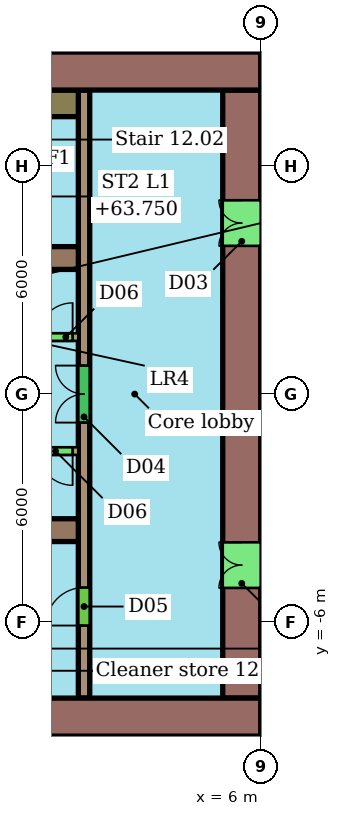
"""IFC4 building model, lengths in metres.
Left out: names, types, materials, properties, quantities, classifications, styles, units other than length and angle.
Written with IfcOpenShell. Run it as: python <this file> out.ifc"""

import sys

from ifc_helpers import new_model, si_unit, direction, frame, frame_2d, origin, place, context, subcontext, project, spatial, rectangle, extrude, element, fill, save


model = new_model("IFC4")
c1 = context("Model", 3, precision=1e-05, world=origin(), true_north=direction((0.0, 1.0)))
c2 = subcontext(c1, "Body", "Model", "MODEL_VIEW")
j1 = project(units=[si_unit("LENGTHUNIT", "METRE"), si_unit("PLANEANGLEUNIT", "RADIAN")], contexts=[c1])
p1 = place(None, origin())
s1 = spatial("IfcSite", under=j1, at=p1, CompositionType="ELEMENT")
p2 = place(p1, origin())
s2 = spatial("IfcBuilding", under=s1, at=p2, CompositionType="ELEMENT")
p3 = place(p2, frame((0.0, 0.0, 61.9)))
s3 = spatial("IfcBuildingStorey", under=s2, at=p3, CompositionType="ELEMENT", Elevation=61.9)
p4 = place(p3, frame((6.0, 8.5, 0.0), z_axis=(0.0, 0.0, 1.0), x_axis=(-1.0, 0.0, 0.0)))
e1 = element("IfcWall", 1, at=p4, inside=s3, PredefinedType="SHEAR", context=c2, shape_type="SweptSolid", body=[
    extrude(rectangle(XDim=12.0, YDim=1.0, at=frame_2d((6.0, 0.0))), origin(), (0.0, 0.0, 1.0), 3.4),
])
p5 = place(p4, frame((5.6, 0.0, 0.0)))
e2 = element("IfcOpeningElement", 2, at=p5, cuts=e1, PredefinedType="OPENING", context=c2, shape_type="SweptSolid", body=[
    extrude(rectangle(XDim=1.2, YDim=2.1, at=frame_2d((0.6, 1.05))), frame((0.0, 0.51, 0.0), z_axis=(0.0, -1.0, 0.0), x_axis=(1.0, 0.0, 0.0)), (0.0, 0.0, 1.0), 1.02),
])
p6 = place(p3, frame((-18.0, -8.5, 0.0), z_axis=(0.0, 0.0, 1.0), x_axis=(1.0, 0.0, 0.0)))
e3 = element("IfcWall", 3, at=p6, inside=s3, PredefinedType="SHEAR", context=c2, shape_type="SweptSolid", body=[
    extrude(rectangle(XDim=24.0, YDim=1.0, at=frame_2d((12.0, 0.0))), origin(), (0.0, 0.0, 1.0), 3.4),
])
p7 = place(p6, frame((6.0, 0.0, 0.0)))
e4 = element("IfcOpeningElement", 4, at=p7, cuts=e3, PredefinedType="OPENING", context=c2, shape_type="SweptSolid", body=[
    extrude(rectangle(XDim=1.2, YDim=2.1, at=frame_2d((0.6, 1.05))), frame((0.0, 0.51, 0.0), z_axis=(0.0, -1.0, 0.0), x_axis=(1.0, 0.0, 0.0)), (0.0, 0.0, 1.0), 1.02),
])
p8 = place(p3, frame((5.5, -8.0, 0.0), z_axis=(0.0, 0.0, 1.0), x_axis=(0.0, 1.0, 0.0)))
e5 = element("IfcWall", 5, at=p8, inside=s3, PredefinedType="SHEAR", context=c2, shape_type="SweptSolid", body=[
    extrude(rectangle(XDim=16.0, YDim=1.0, at=frame_2d((8.0, 0.0))), origin(), (0.0, 0.0, 1.0), 3.4),
])
p9 = place(p8, frame((2.9, 0.0, 0.0)))
e6 = element("IfcOpeningElement", 6, at=p9, cuts=e5, PredefinedType="OPENING", context=c2, shape_type="SweptSolid", body=[
    extrude(rectangle(XDim=1.2, YDim=2.1, at=frame_2d((0.6, 1.05))), frame((0.0, 0.51, 0.0), z_axis=(0.0, -1.0, 0.0), x_axis=(1.0, 0.0, 0.0)), (0.0, 0.0, 1.0), 1.02),
])
p10 = place(p8, frame((11.9, 0.0, 0.0)))
e7 = element("IfcOpeningElement", 7, at=p10, cuts=e5, PredefinedType="OPENING", context=c2, shape_type="SweptSolid", body=[
    extrude(rectangle(XDim=1.2, YDim=2.1, at=frame_2d((0.6, 1.05))), frame((0.0, 0.51, 0.0), z_axis=(0.0, -1.0, 0.0), x_axis=(1.0, 0.0, 0.0)), (0.0, 0.0, 1.0), 1.02),
])
for number, where, z_axis, x_axis in (
    (8, (-6.0, 3.58, 0.0), (0.0, 0.0, 1.0), (1.0, 0.0, 0.0)),
    (9, (-6.0, -3.58, 0.0), (0.0, 0.0, 1.0), (1.0, 0.0, 0.0)),
):
    element("IfcWall", number, at=place(p3, frame(where, z_axis=z_axis, x_axis=x_axis)), inside=s3, PredefinedType="SHEAR", context=c2, shape_type="SweptSolid", body=[
        extrude(rectangle(XDim=7.2, YDim=0.6, at=frame_2d((3.6, 0.0))), origin(), (0.0, 0.0, 1.0), 3.4),
    ])
p11 = place(p3, frame((1.35, -8.0, 0.0), z_axis=(0.0, 0.0, 1.0), x_axis=(0.0, 1.0, 0.0)))
e10 = element("IfcWall", 10, at=p11, inside=s3, PredefinedType="SHEAR", context=c2, shape_type="SweptSolid", body=[
    extrude(rectangle(XDim=16.0, YDim=0.3, at=frame_2d((8.0, 0.0))), origin(), (0.0, 0.0, 1.0), 3.4),
])
p12 = place(p11, frame((1.91, 0.0, 0.0)))
e11 = element("IfcOpeningElement", 11, at=p12, cuts=e10, PredefinedType="OPENING", context=c2, shape_type="SweptSolid", body=[
    extrude(rectangle(XDim=1.0, YDim=2.1, at=frame_2d((0.5, 1.05))), frame((0.0, 0.16, 0.0), z_axis=(0.0, -1.0, 0.0), x_axis=(1.0, 0.0, 0.0)), (0.0, 0.0, 1.0), 0.32),
])
p13 = place(p11, frame((7.25, 0.0, 0.0)))
e12 = element("IfcOpeningElement", 12, at=p13, cuts=e10, PredefinedType="OPENING", context=c2, shape_type="SweptSolid", body=[
    extrude(rectangle(XDim=1.5, YDim=2.1, at=frame_2d((0.75, 1.05))), frame((0.0, 0.16, 0.0), z_axis=(0.0, -1.0, 0.0), x_axis=(1.0, 0.0, 0.0)), (0.0, 0.0, 1.0), 0.32),
])
p14 = place(p3, frame((-13.2, 1.5, 0.0), z_axis=(0.0, 0.0, 1.0), x_axis=(1.0, 0.0, 0.0)))
e13 = element("IfcWall", 13, at=p14, inside=s3, PredefinedType="SHEAR", context=c2, shape_type="SweptSolid", body=[
    extrude(rectangle(XDim=14.4, YDim=0.2, at=frame_2d((7.2, 0.0))), origin(), (0.0, 0.0, 1.0), 3.4),
])
p15 = place(p14, frame((0.546, 0.0, 0.0)))
e14 = element("IfcOpeningElement", 14, at=p15, cuts=e13, PredefinedType="OPENING", context=c2, shape_type="SweptSolid", body=[
    extrude(rectangle(XDim=1.1, YDim=2.1, at=frame_2d((0.55, 1.05))), frame((0.0, 0.11, 0.0), z_axis=(0.0, -1.0, 0.0), x_axis=(1.0, 0.0, 0.0)), (0.0, 0.0, 1.0), 0.22),
])
p16 = place(p14, frame((2.988, 0.0, 0.0)))
e15 = element("IfcOpeningElement", 15, at=p16, cuts=e13, PredefinedType="OPENING", context=c2, shape_type="SweptSolid", body=[
    extrude(rectangle(XDim=1.1, YDim=2.1, at=frame_2d((0.55, 1.05))), frame((0.0, 0.11, 0.0), z_axis=(0.0, -1.0, 0.0), x_axis=(1.0, 0.0, 0.0)), (0.0, 0.0, 1.0), 0.22),
])
p17 = place(p14, frame((5.429, 0.0, 0.0)))
e16 = element("IfcOpeningElement", 16, at=p17, cuts=e13, PredefinedType="OPENING", context=c2, shape_type="SweptSolid", body=[
    extrude(rectangle(XDim=1.1, YDim=2.1, at=frame_2d((0.55, 1.05))), frame((0.0, 0.11, 0.0), z_axis=(0.0, -1.0, 0.0), x_axis=(1.0, 0.0, 0.0)), (0.0, 0.0, 1.0), 0.22),
])
p18 = place(p14, frame((7.871, 0.0, 0.0)))
e17 = element("IfcOpeningElement", 17, at=p18, cuts=e13, PredefinedType="OPENING", context=c2, shape_type="SweptSolid", body=[
    extrude(rectangle(XDim=1.1, YDim=2.1, at=frame_2d((0.55, 1.05))), frame((0.0, 0.11, 0.0), z_axis=(0.0, -1.0, 0.0), x_axis=(1.0, 0.0, 0.0)), (0.0, 0.0, 1.0), 0.22),
])
p19 = place(p14, frame((10.21, 0.0, 0.0)))
e18 = element("IfcOpeningElement", 18, at=p19, cuts=e13, PredefinedType="OPENING", context=c2, shape_type="SweptSolid", body=[
    extrude(rectangle(XDim=1.0, YDim=2.1, at=frame_2d((0.5, 1.05))), frame((0.0, 0.11, 0.0), z_axis=(0.0, -1.0, 0.0), x_axis=(1.0, 0.0, 0.0)), (0.0, 0.0, 1.0), 0.22),
])
p20 = place(p14, frame((13.35, 0.0, 0.0)))
e19 = element("IfcOpeningElement", 19, at=p20, cuts=e13, PredefinedType="OPENING", context=c2, shape_type="SweptSolid", body=[
    extrude(rectangle(XDim=0.9, YDim=2.1, at=frame_2d((0.45, 1.05))), frame((0.0, 0.11, 0.0), z_axis=(0.0, -1.0, 0.0), x_axis=(1.0, 0.0, 0.0)), (0.0, 0.0, 1.0), 0.22),
])
p21 = place(p3, frame((1.2, -1.5, 0.0), z_axis=(0.0, 0.0, 1.0), x_axis=(-1.0, 0.0, 0.0)))
e20 = element("IfcWall", 20, at=p21, inside=s3, PredefinedType="SHEAR", context=c2, shape_type="SweptSolid", body=[
    extrude(rectangle(XDim=14.4, YDim=0.2, at=frame_2d((7.2, 0.0))), origin(), (0.0, 0.0, 1.0), 3.4),
])
p22 = place(p21, frame((7.821, 0.0, 0.0)))
e21 = element("IfcOpeningElement", 21, at=p22, cuts=e20, PredefinedType="OPENING", context=c2, shape_type="SweptSolid", body=[
    extrude(rectangle(XDim=1.2, YDim=2.1, at=frame_2d((0.6, 1.05))), frame((0.0, 0.11, 0.0), z_axis=(0.0, -1.0, 0.0), x_axis=(1.0, 0.0, 0.0)), (0.0, 0.0, 1.0), 0.22),
])
p23 = place(p21, frame((0.15, 0.0, 0.0)))
e22 = element("IfcOpeningElement", 22, at=p23, cuts=e20, PredefinedType="OPENING", context=c2, shape_type="SweptSolid", body=[
    extrude(rectangle(XDim=0.9, YDim=2.1, at=frame_2d((0.45, 1.05))), frame((0.0, 0.11, 0.0), z_axis=(0.0, -1.0, 0.0), x_axis=(1.0, 0.0, 0.0)), (0.0, 0.0, 1.0), 0.22),
])
p24 = place(p3, frame((0.4, 7.65, 0.0), z_axis=(0.0, 0.0, 1.0), x_axis=(1.0, 0.0, 0.0)))
e23 = element("IfcWall", 23, at=p24, inside=s3, PredefinedType="SHEAR", context=c2, shape_type="SweptSolid", body=[
    extrude(rectangle(XDim=0.8, YDim=0.7, at=frame_2d((0.4, 0.0))), origin(), (0.0, 0.0, 1.0), 3.4),
])
p25 = place(p9, origin())
e24 = element("IfcDoor", 24, at=p25, inside=s3, OperationType="DOUBLE_DOOR_SINGLE_SWING", PredefinedType="NOTDEFINED", context=c2, shape_type="SweptSolid", body=[
    extrude(rectangle(XDim=1.2, YDim=2.1, at=frame_2d((0.6, 1.05))), frame((0.0, 0.025, 0.0), z_axis=(0.0, -1.0, 0.0), x_axis=(1.0, 0.0, 0.0)), (0.0, 0.0, 1.0), 0.05),
])
fill(e6, e24)
p26 = place(p10, origin())
e25 = element("IfcDoor", 25, at=p26, inside=s3, OperationType="DOUBLE_DOOR_SINGLE_SWING", PredefinedType="NOTDEFINED", context=c2, shape_type="SweptSolid", body=[
    extrude(rectangle(XDim=1.2, YDim=2.1, at=frame_2d((0.6, 1.05))), frame((0.0, 0.025, 0.0), z_axis=(0.0, -1.0, 0.0), x_axis=(1.0, 0.0, 0.0)), (0.0, 0.0, 1.0), 0.05),
])
fill(e7, e25)
p27 = place(p12, origin())
e26 = element("IfcDoor", 26, at=p27, inside=s3, OperationType="SINGLE_SWING_LEFT", PredefinedType="NOTDEFINED", context=c2, shape_type="SweptSolid", body=[
    extrude(rectangle(XDim=1.0, YDim=2.1, at=frame_2d((0.5, 1.05))), frame((0.0, 0.025, 0.0), z_axis=(0.0, -1.0, 0.0), x_axis=(1.0, 0.0, 0.0)), (0.0, 0.0, 1.0), 0.05),
])
fill(e11, e26)
p28 = place(p13, origin())
e27 = element("IfcDoor", 27, at=p28, inside=s3, OperationType="DOUBLE_DOOR_SINGLE_SWING", PredefinedType="NOTDEFINED", context=c2, shape_type="SweptSolid", body=[
    extrude(rectangle(XDim=1.5, YDim=2.1, at=frame_2d((0.75, 1.05))), frame((0.0, 0.025, 0.0), z_axis=(0.0, -1.0, 0.0), x_axis=(1.0, 0.0, 0.0)), (0.0, 0.0, 1.0), 0.05),
])
fill(e12, e27)
p29 = place(p20, origin())
e28 = element("IfcDoor", 28, at=p29, inside=s3, OperationType="SINGLE_SWING_RIGHT", PredefinedType="NOTDEFINED", context=c2, shape_type="SweptSolid", body=[
    extrude(rectangle(XDim=0.9, YDim=2.1, at=frame_2d((0.45, 1.05))), frame((0.0, 0.025, 0.0), z_axis=(0.0, -1.0, 0.0), x_axis=(1.0, 0.0, 0.0)), (0.0, 0.0, 1.0), 0.05),
])
fill(e19, e28)
p30 = place(p23, origin())
e29 = element("IfcDoor", 29, at=p30, inside=s3, OperationType="SINGLE_SWING_LEFT", PredefinedType="NOTDEFINED", context=c2, shape_type="SweptSolid", body=[
    extrude(rectangle(XDim=0.9, YDim=2.1, at=frame_2d((0.45, 1.05))), frame((0.0, 0.025, 0.0), z_axis=(0.0, -1.0, 0.0), x_axis=(1.0, 0.0, 0.0)), (0.0, 0.0, 1.0), 0.05),
])
fill(e22, e29)
save(model, sys.argv[1])
